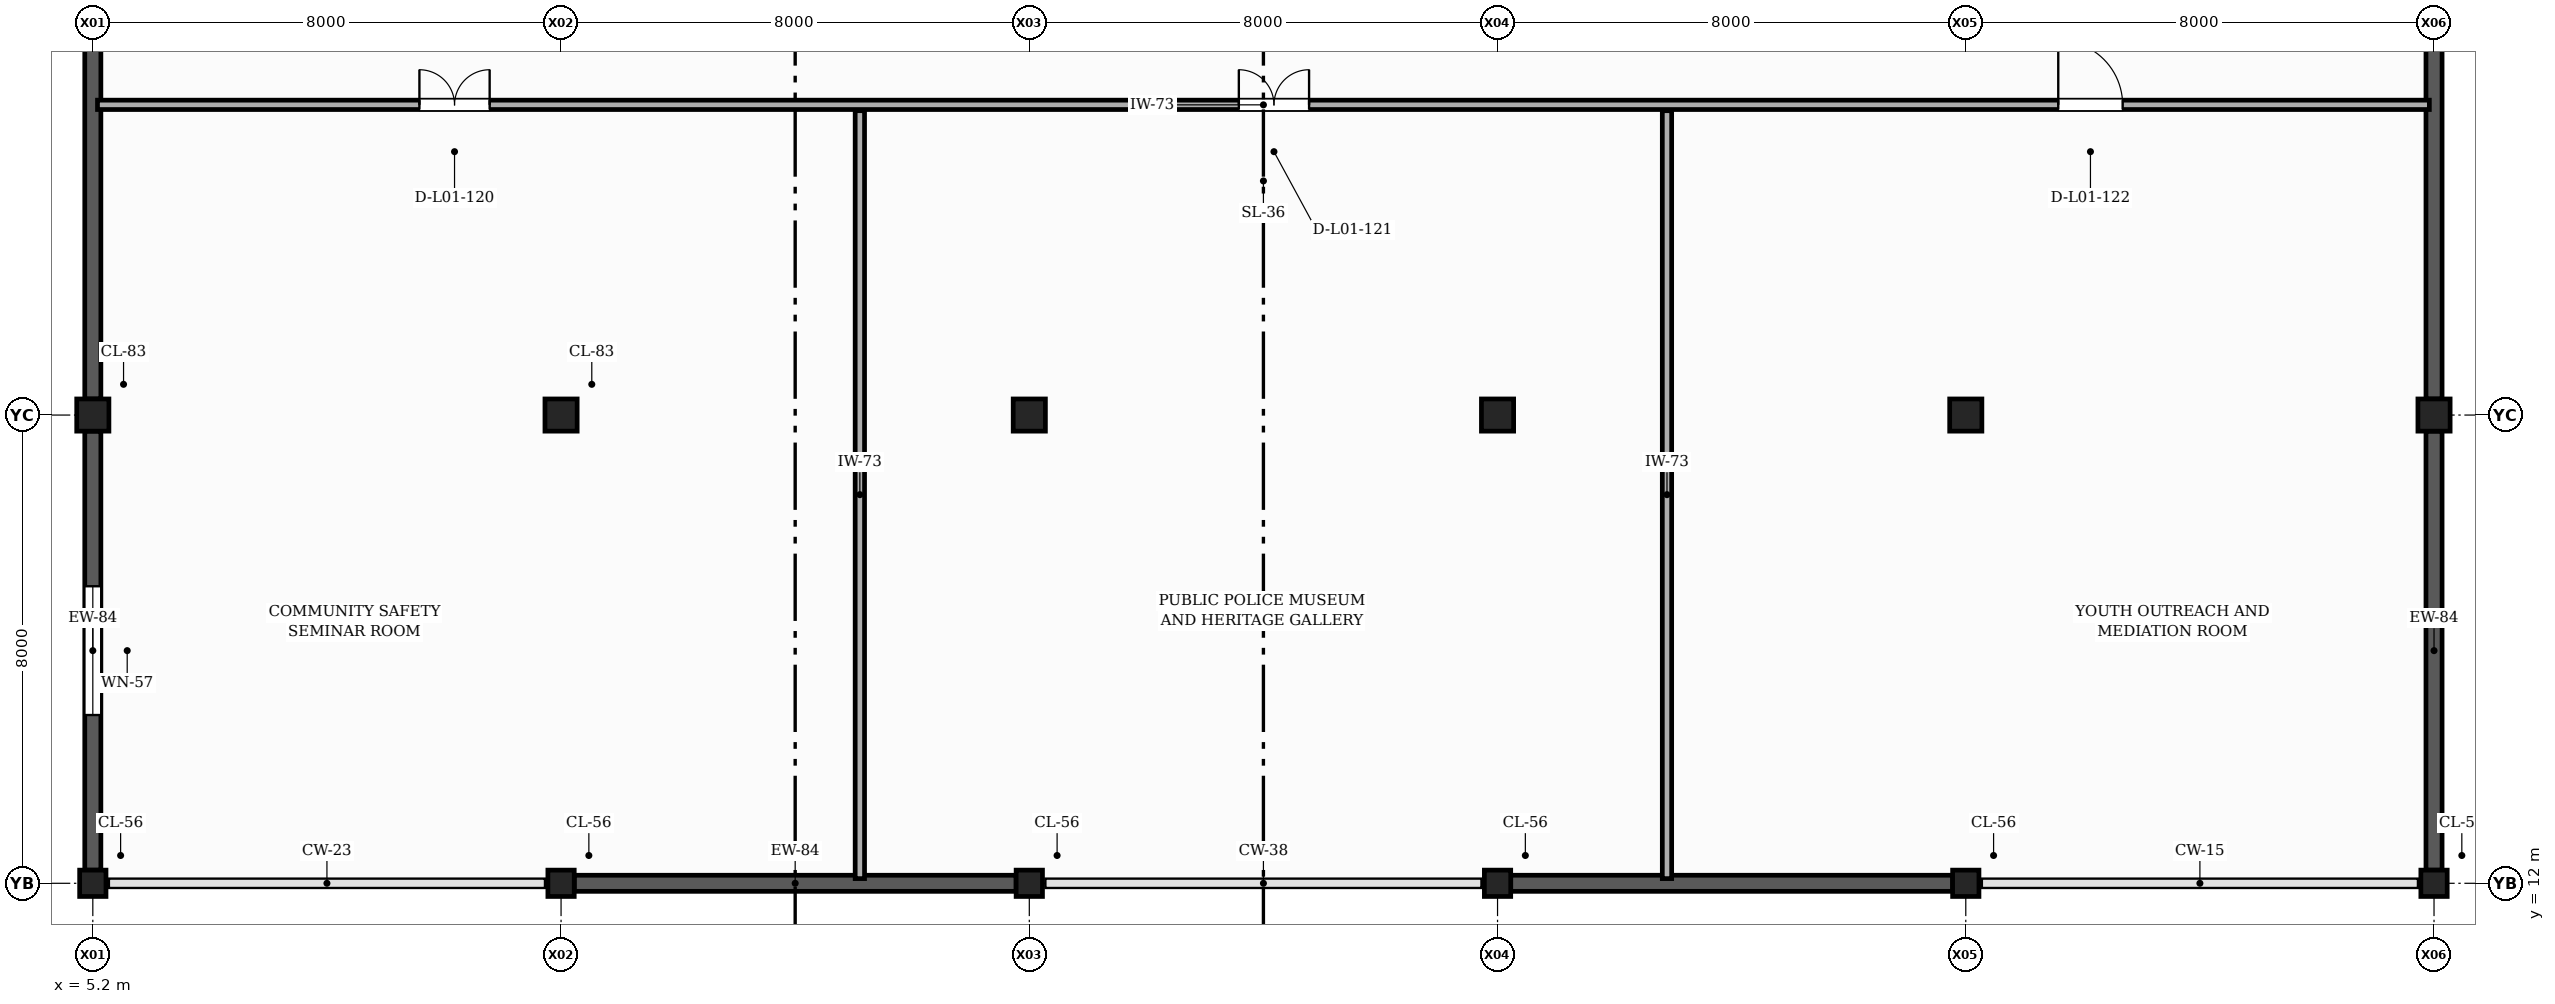
"""IFC4 building model, lengths in metres.
Left out: names, types, materials, properties, quantities, classifications, styles, units other than length and angle.
Written with IfcOpenShell. Run it as: python <this file> out.ifc"""

import sys

from ifc_helpers import new_model, si_unit, direction, frame, frame_2d, origin, origin_2d, place, context, subcontext, project, spatial, rectangle, extrude, element, fill, save


model = new_model("IFC4")
c1 = context("Model", 3, precision=1e-05, world=origin(), true_north=direction((0.0, 1.0)))
c2 = subcontext(c1, "Body", "Model", "MODEL_VIEW")
j1 = project(units=[si_unit("LENGTHUNIT", "METRE"), si_unit("PLANEANGLEUNIT", "RADIAN")], contexts=[c1])
p1 = place(None, origin())
s1 = spatial("IfcSite", under=j1, at=p1, CompositionType="ELEMENT")
p2 = place(p1, origin())
s2 = spatial("IfcBuilding", under=s1, at=p2, CompositionType="ELEMENT")
p3 = place(p2, frame((0.0, 0.0, 4.8)))
s3 = spatial("IfcBuildingStorey", under=s2, at=p3, CompositionType="ELEMENT", Elevation=4.8)
p4 = place(p3, frame((5.2, 12.0, 0.0), z_axis=(0.0, 0.0, 1.0), x_axis=(1.0, 0.0, 0.0)))
e1 = element("IfcColumn", 1, at=p4, inside=s3, PredefinedType="COLUMN", context=c2, shape_type="SweptSolid", body=[
    extrude(rectangle(XDim=0.45, YDim=0.45, at=origin_2d()), origin(), (0.0, 0.0, 1.0), 4.2),
])
p5 = place(p3, frame((5.2, 20.0, 0.0), z_axis=(0.0, 0.0, 1.0), x_axis=(1.0, 0.0, 0.0)))
e2 = element("IfcColumn", 2, at=p5, inside=s3, PredefinedType="COLUMN", context=c2, shape_type="SweptSolid", body=[
    extrude(rectangle(XDim=0.55, YDim=0.55, at=origin_2d()), origin(), (0.0, 0.0, 1.0), 4.2),
])
p6 = place(p3, frame((13.2, 12.0, 0.0), z_axis=(0.0, 0.0, 1.0), x_axis=(1.0, 0.0, 0.0)))
e3 = element("IfcColumn", 3, at=p6, inside=s3, PredefinedType="COLUMN", context=c2, shape_type="SweptSolid", body=[
    extrude(rectangle(XDim=0.45, YDim=0.45, at=origin_2d()), origin(), (0.0, 0.0, 1.0), 4.2),
])
p7 = place(p3, frame((13.2, 20.0, 0.0), z_axis=(0.0, 0.0, 1.0), x_axis=(1.0, 0.0, 0.0)))
e4 = element("IfcColumn", 4, at=p7, inside=s3, PredefinedType="COLUMN", context=c2, shape_type="SweptSolid", body=[
    extrude(rectangle(XDim=0.55, YDim=0.55, at=origin_2d()), origin(), (0.0, 0.0, 1.0), 4.2),
])
p8 = place(p3, frame((21.2, 12.0, 0.0), z_axis=(0.0, 0.0, 1.0), x_axis=(1.0, 0.0, 0.0)))
e5 = element("IfcColumn", 5, at=p8, inside=s3, PredefinedType="COLUMN", context=c2, shape_type="SweptSolid", body=[
    extrude(rectangle(XDim=0.45, YDim=0.45, at=origin_2d()), origin(), (0.0, 0.0, 1.0), 4.2),
])
p9 = place(p3, frame((21.2, 20.0, 0.0), z_axis=(0.0, 0.0, 1.0), x_axis=(1.0, 0.0, 0.0)))
e6 = element("IfcColumn", 6, at=p9, inside=s3, PredefinedType="COLUMN", context=c2, shape_type="SweptSolid", body=[
    extrude(rectangle(XDim=0.55, YDim=0.55, at=origin_2d()), origin(), (0.0, 0.0, 1.0), 4.2),
])
p10 = place(p3, frame((29.2, 12.0, 0.0), z_axis=(0.0, 0.0, 1.0), x_axis=(1.0, 0.0, 0.0)))
e7 = element("IfcColumn", 7, at=p10, inside=s3, PredefinedType="COLUMN", context=c2, shape_type="SweptSolid", body=[
    extrude(rectangle(XDim=0.45, YDim=0.45, at=origin_2d()), origin(), (0.0, 0.0, 1.0), 4.2),
])
p11 = place(p3, frame((29.2, 20.0, 0.0), z_axis=(0.0, 0.0, 1.0), x_axis=(1.0, 0.0, 0.0)))
e8 = element("IfcColumn", 8, at=p11, inside=s3, PredefinedType="COLUMN", context=c2, shape_type="SweptSolid", body=[
    extrude(rectangle(XDim=0.55, YDim=0.55, at=origin_2d()), origin(), (0.0, 0.0, 1.0), 4.2),
])
p12 = place(p3, frame((37.2, 12.0, 0.0), z_axis=(0.0, 0.0, 1.0), x_axis=(1.0, 0.0, 0.0)))
e9 = element("IfcColumn", 9, at=p12, inside=s3, PredefinedType="COLUMN", context=c2, shape_type="SweptSolid", body=[
    extrude(rectangle(XDim=0.45, YDim=0.45, at=origin_2d()), origin(), (0.0, 0.0, 1.0), 4.2),
])
p13 = place(p3, frame((37.2, 20.0, 0.0), z_axis=(0.0, 0.0, 1.0), x_axis=(1.0, 0.0, 0.0)))
e10 = element("IfcColumn", 10, at=p13, inside=s3, PredefinedType="COLUMN", context=c2, shape_type="SweptSolid", body=[
    extrude(rectangle(XDim=0.55, YDim=0.55, at=origin_2d()), origin(), (0.0, 0.0, 1.0), 4.2),
])
p14 = place(p3, frame((45.2, 12.0, 0.0), z_axis=(0.0, 0.0, 1.0), x_axis=(1.0, 0.0, 0.0)))
e11 = element("IfcColumn", 11, at=p14, inside=s3, PredefinedType="COLUMN", context=c2, shape_type="SweptSolid", body=[
    extrude(rectangle(XDim=0.45, YDim=0.45, at=origin_2d()), origin(), (0.0, 0.0, 1.0), 4.2),
])
p15 = place(p3, frame((45.2, 20.0, 0.0), z_axis=(0.0, 0.0, 1.0), x_axis=(1.0, 0.0, 0.0)))
e12 = element("IfcColumn", 12, at=p15, inside=s3, PredefinedType="COLUMN", context=c2, shape_type="SweptSolid", body=[
    extrude(rectangle(XDim=0.55, YDim=0.55, at=origin_2d()), origin(), (0.0, 0.0, 1.0), 4.2),
])
for number, where, z_axis, x_axis in (
    (13, (13.425, 12.0, 0.0), (0.0, 0.0, 1.0), (1.0, 0.0, 0.0)),
    (14, (29.425, 12.0, 0.0), (0.0, 0.0, 1.0), (1.0, 0.0, 0.0)),
):
    element("IfcWall", number, at=place(p3, frame(where, z_axis=z_axis, x_axis=x_axis)), inside=s3, PredefinedType="SOLIDWALL", context=c2, shape_type="SweptSolid", body=[
        extrude(rectangle(XDim=7.55, YDim=0.275, at=frame_2d((3.775, 0.0))), origin(), (0.0, 0.0, 1.0), 3.16),
    ])
p16 = place(p3, frame((45.2, 12.225, 0.0), z_axis=(0.0, 0.0, 1.0), x_axis=(0.0, 1.0, 0.0)))
e15 = element("IfcWall", 15, at=p16, inside=s3, PredefinedType="SOLIDWALL", context=c2, shape_type="SweptSolid", body=[
    extrude(rectangle(XDim=7.5, YDim=0.275, at=frame_2d((3.75, 0.0))), origin(), (0.0, 0.0, 1.0), 3.26),
])
for number, where, z_axis, x_axis in (
    (16, (45.2, 20.275, 0.0), (0.0, 0.0, 1.0), (0.0, 1.0, 0.0)),
    (17, (5.2, 27.725, 0.0), (0.0, 0.0, 1.0), (0.0, -1.0, 0.0)),
):
    element("IfcWall", number, at=place(p3, frame(where, z_axis=z_axis, x_axis=x_axis)), inside=s3, PredefinedType="SOLIDWALL", context=c2, shape_type="SweptSolid", body=[
        extrude(rectangle(XDim=7.45, YDim=0.275, at=frame_2d((3.725, 0.0))), origin(), (0.0, 0.0, 1.0), 3.26),
    ])
p17 = place(p3, frame((5.2, 19.725, 0.0), z_axis=(0.0, 0.0, 1.0), x_axis=(0.0, -1.0, 0.0)))
e18 = element("IfcWall", 18, at=p17, inside=s3, PredefinedType="SOLIDWALL", context=c2, shape_type="SweptSolid", body=[
    extrude(rectangle(XDim=7.5, YDim=0.275, at=frame_2d((3.75, 0.0))), origin(), (0.0, 0.0, 1.0), 3.26),
])
p18 = place(p17, frame((2.65, 0.0, 0.9)))
e19 = element("IfcOpeningElement", 19, at=p18, cuts=e18, PredefinedType="OPENING", context=c2, shape_type="SweptSolid", body=[
    extrude(rectangle(XDim=2.2, YDim=1.6, at=frame_2d((1.1, 0.8))), frame((0.0, 0.147, 0.0), z_axis=(0.0, -1.0, 0.0), x_axis=(1.0, 0.0, 0.0)), (0.0, 0.0, 1.0), 0.295),
])
p19 = place(p3, frame((18.305, 12.08, 0.0), z_axis=(0.0, 0.0, 1.0), x_axis=(0.0, 1.0, 0.0)))
e20 = element("IfcWall", 20, at=p19, inside=s3, PredefinedType="PARTITIONING", context=c2, shape_type="SweptSolid", body=[
    extrude(rectangle(XDim=13.12, YDim=0.16, at=frame_2d((6.56, 0.0))), origin(), (0.0, 0.0, 1.0), 3.145),
])
p20 = place(p3, frame((32.095, 12.08, 0.0), z_axis=(0.0, 0.0, 1.0), x_axis=(0.0, 1.0, 0.0)))
e21 = element("IfcWall", 21, at=p20, inside=s3, PredefinedType="PARTITIONING", context=c2, shape_type="SweptSolid", body=[
    extrude(rectangle(XDim=13.12, YDim=0.16, at=frame_2d((6.56, 0.0))), origin(), (0.0, 0.0, 1.0), 3.045),
])
p21 = place(p3, frame((5.28, 25.3, 0.0), z_axis=(0.0, 0.0, 1.0), x_axis=(1.0, 0.0, 0.0)))
e22 = element("IfcWall", 22, at=p21, inside=s3, PredefinedType="PARTITIONING", context=c2, shape_type="SweptSolid", body=[
    extrude(rectangle(XDim=39.84, YDim=0.16, at=frame_2d((19.92, 0.0))), origin(), (0.0, 0.0, 1.0), 3.045),
])
p22 = place(p21, frame((5.5, 0.0, 0.0)))
e23 = element("IfcOpeningElement", 23, at=p22, cuts=e22, PredefinedType="OPENING", context=c2, shape_type="SweptSolid", body=[
    extrude(rectangle(XDim=1.2, YDim=2.2, at=frame_2d((0.6, 1.1))), frame((0.0, 0.09, 0.0), z_axis=(0.0, -1.0, 0.0), x_axis=(1.0, 0.0, 0.0)), (0.0, 0.0, 1.0), 0.18),
])
p23 = place(p21, frame((19.5, 0.0, 0.0)))
e24 = element("IfcOpeningElement", 24, at=p23, cuts=e22, PredefinedType="OPENING", context=c2, shape_type="SweptSolid", body=[
    extrude(rectangle(XDim=1.2, YDim=2.2, at=frame_2d((0.6, 1.1))), frame((0.0, 0.09, 0.0), z_axis=(0.0, -1.0, 0.0), x_axis=(1.0, 0.0, 0.0)), (0.0, 0.0, 1.0), 0.18),
])
p24 = place(p21, frame((33.5, 0.0, 0.0)))
e25 = element("IfcOpeningElement", 25, at=p24, cuts=e22, PredefinedType="OPENING", context=c2, shape_type="SweptSolid", body=[
    extrude(rectangle(XDim=1.1, YDim=2.1, at=frame_2d((0.55, 1.05))), frame((0.0, 0.09, 0.0), z_axis=(0.0, -1.0, 0.0), x_axis=(1.0, 0.0, 0.0)), (0.0, 0.0, 1.0), 0.18),
])
p25 = place(p18, origin())
e26 = element("IfcWindow", 26, at=p25, inside=s3, PartitioningType="SINGLE_PANEL", PredefinedType="WINDOW", context=c2, shape_type="SweptSolid", body=[
    extrude(rectangle(XDim=2.2, YDim=1.6, at=frame_2d((1.1, 0.8))), frame((0.0, 0.03, 0.0), z_axis=(0.0, -1.0, 0.0), x_axis=(1.0, 0.0, 0.0)), (0.0, 0.0, 1.0), 0.06),
])
fill(e19, e26)
p26 = place(p22, origin())
e27 = element("IfcDoor", 27, at=p26, inside=s3, OperationType="DOUBLE_DOOR_SINGLE_SWING", PredefinedType="DOOR", context=c2, shape_type="SweptSolid", body=[
    extrude(rectangle(XDim=1.2, YDim=2.2, at=frame_2d((0.6, 1.1))), frame((0.0, 0.025, 0.0), z_axis=(0.0, -1.0, 0.0), x_axis=(1.0, 0.0, 0.0)), (0.0, 0.0, 1.0), 0.05),
])
fill(e23, e27)
p27 = place(p23, origin())
e28 = element("IfcDoor", 28, at=p27, inside=s3, OperationType="DOUBLE_DOOR_SINGLE_SWING", PredefinedType="DOOR", context=c2, shape_type="SweptSolid", body=[
    extrude(rectangle(XDim=1.2, YDim=2.2, at=frame_2d((0.6, 1.1))), frame((0.0, 0.025, 0.0), z_axis=(0.0, -1.0, 0.0), x_axis=(1.0, 0.0, 0.0)), (0.0, 0.0, 1.0), 0.05),
])
fill(e24, e28)
p28 = place(p24, origin())
e29 = element("IfcDoor", 29, at=p28, inside=s3, OperationType="SINGLE_SWING_LEFT", PredefinedType="DOOR", context=c2, shape_type="SweptSolid", body=[
    extrude(rectangle(XDim=1.1, YDim=2.1, at=frame_2d((0.55, 1.05))), frame((0.0, 0.025, 0.0), z_axis=(0.0, -1.0, 0.0), x_axis=(1.0, 0.0, 0.0)), (0.0, 0.0, 1.0), 0.05),
])
fill(e25, e29)
save(model, sys.argv[1])
